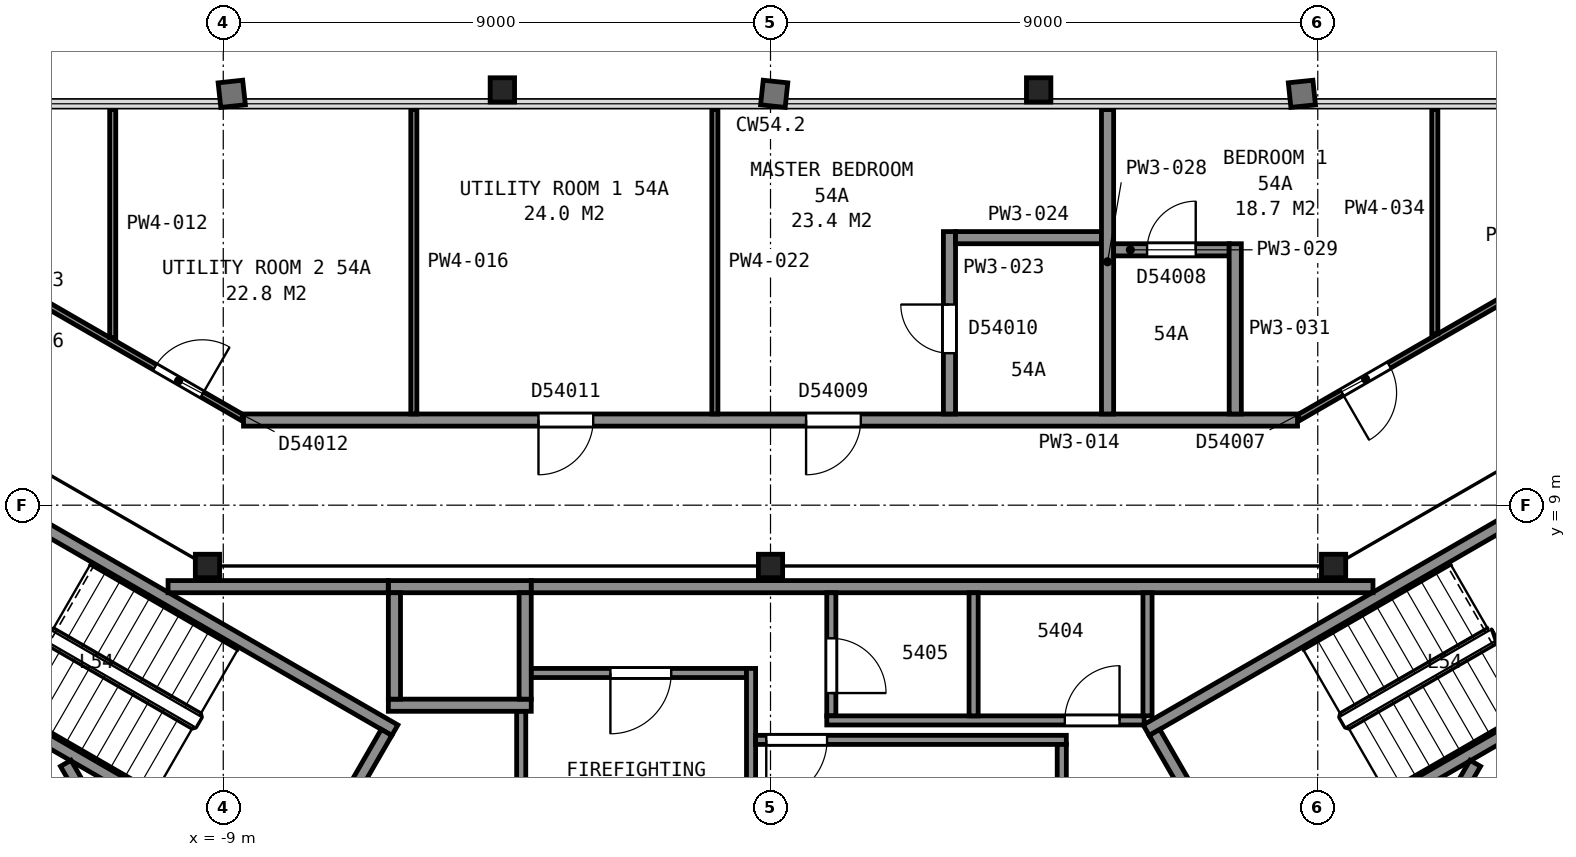
"""IFC4 building model, lengths in metres.
Left out: names, types, materials, properties, quantities, classifications, styles, units other than length and angle.
Written with IfcOpenShell. Run it as: python <this file> out.ifc"""

import sys

from ifc_helpers import new_model, si_unit, direction, frame, frame_2d, origin, origin_2d, place, context, subcontext, project, spatial, rectangle, i_section, extrude, element, fill, save


model = new_model("IFC4")
c1 = context("Model", 3, precision=1e-05, world=origin(), true_north=direction((0.0, 1.0)))
c2 = subcontext(c1, "Body", "Model", "MODEL_VIEW")
j1 = project(units=[si_unit("LENGTHUNIT", "METRE"), si_unit("PLANEANGLEUNIT", "RADIAN")], contexts=[c1])
p1 = place(None, origin())
s1 = spatial("IfcSite", under=j1, at=p1, CompositionType="ELEMENT")
p2 = place(p1, origin())
s2 = spatial("IfcBuilding", under=s1, at=p2, CompositionType="ELEMENT")
p3 = place(p2, frame((0.0, 0.0, 217.5)))
s3 = spatial("IfcBuildingStorey", under=s2, at=p3, CompositionType="ELEMENT", Elevation=217.5)
for number, where, z_axis, x_axis in (
    (1, (4.41, 15.83, 0.035), (0.0, 0.0, 1.0), (1.0, 0.0, 0.0)),
    (2, (-4.41, 15.83, 0.035), (0.0, 0.0, 1.0), (1.0, 0.0, 0.0)),
):
    element("IfcColumn", number, at=place(p3, frame(where, z_axis=z_axis, x_axis=x_axis)), inside=s3, PredefinedType="COLUMN", context=c2, shape_type="SweptSolid", body=[
        extrude(i_section(OverallWidth=0.401, OverallDepth=0.399, WebThickness=0.025, FlangeThickness=0.04, FilletRadius=0.015, at=origin_2d()), origin(), (0.0, 0.0, 1.0), 3.665),
    ])
for number, where, z_axis, x_axis in (
    (3, (9.26, 8.0, 0.0), (0.0, 0.0, 1.0), (1.0, 0.0, 0.0)),
    (4, (0.0, 8.0, 0.0), (0.0, 0.0, 1.0), (1.0, 0.0, 0.0)),
    (5, (-9.26, 8.0, 0.0), (0.0, 0.0, 1.0), (1.0, 0.0, 0.0)),
):
    element("IfcColumn", number, at=place(p3, frame(where, z_axis=z_axis, x_axis=x_axis)), inside=s3, PredefinedType="COLUMN", context=c2, shape_type="SweptSolid", body=[
        extrude(i_section(OverallWidth=0.399, OverallDepth=0.386, WebThickness=0.021, FlangeThickness=0.033, FilletRadius=0.015, at=origin_2d()), origin(), (0.0, 0.0, 1.0), 3.7),
    ])
for number, where, z_axis, x_axis in (
    (6, (6.178, 5.299, 0.0), (0.0, 0.0, 1.0), (0.866, 0.5, 0.0)),
    (7, (7.678, 2.701, 0.0), (0.0, 0.0, 1.0), (0.866, 0.5, 0.0)),
):
    element("IfcWall", number, at=place(p3, frame(where, z_axis=z_axis, x_axis=x_axis)), inside=s3, PredefinedType="PARTITIONING", context=c2, shape_type="SweptSolid", body=[
        extrude(rectangle(XDim=9.6, YDim=0.2, at=frame_2d((4.8, 0.0))), origin(), (0.0, 0.0, 1.0), 3.45),
    ])
p4 = place(p3, frame((7.715, 2.838, 0.0), z_axis=(0.0, 0.0, 1.0), x_axis=(-0.500049511043, 0.865996816683, 0.0)))
e8 = element("IfcWall", 8, at=p4, inside=s3, PredefinedType="PARTITIONING", context=c2, shape_type="SweptSolid", body=[
    extrude(rectangle(XDim=2.8, YDim=0.2, at=frame_2d((1.4, 0.0))), origin(), (0.0, 0.0, 1.0), 3.45),
])
for number, where, z_axis, x_axis in (
    (9, (-7.678, 2.701, 0.0), (0.0, 0.0, 1.0), (-0.866, 0.5, 0.0)),
    (10, (-6.178, 5.299, 0.0), (0.0, 0.0, 1.0), (-0.866, 0.5, 0.0)),
):
    element("IfcWall", number, at=place(p3, frame(where, z_axis=z_axis, x_axis=x_axis)), inside=s3, PredefinedType="PARTITIONING", context=c2, shape_type="SweptSolid", body=[
        extrude(rectangle(XDim=9.6, YDim=0.2, at=frame_2d((4.8, 0.0))), origin(), (0.0, 0.0, 1.0), 3.45),
    ])
p5 = place(p3, frame((-6.315, 5.262, 0.0), z_axis=(0.0, 0.0, 1.0), x_axis=(-0.500049511043, -0.865996816683, 0.0)))
e11 = element("IfcWall", 11, at=p5, inside=s3, PredefinedType="PARTITIONING", context=c2, shape_type="SweptSolid", body=[
    extrude(rectangle(XDim=2.8, YDim=0.2, at=frame_2d((1.4, 0.0))), origin(), (0.0, 0.0, 1.0), 3.45),
])
for number, where, z_axis, x_axis in (
    (12, (-6.285, 5.71, 0.0), (0.0, 0.0, 1.0), (1.0, 0.0, 0.0)),
    (13, (-6.285, 7.66, 0.0), (0.0, 0.0, 1.0), (1.0, 0.0, 0.0)),
):
    element("IfcWall", number, at=place(p3, frame(where, z_axis=z_axis, x_axis=x_axis)), inside=s3, PredefinedType="PARTITIONING", context=c2, shape_type="SweptSolid", body=[
        extrude(rectangle(XDim=2.35, YDim=0.2, at=frame_2d((1.175, 0.0))), origin(), (0.0, 0.0, 1.0), 3.7),
    ])
for number, where, z_axis, x_axis in (
    (14, (-4.035, 5.81, 0.0), (0.0, 0.0, 1.0), (0.0, 1.0, 0.0)),
    (15, (-6.185, 5.81, 0.0), (0.0, 0.0, 1.0), (0.0, 1.0, 0.0)),
):
    element("IfcWall", number, at=place(p3, frame(where, z_axis=z_axis, x_axis=x_axis)), inside=s3, PredefinedType="PARTITIONING", context=c2, shape_type="SweptSolid", body=[
        extrude(rectangle(XDim=1.75, YDim=0.2, at=frame_2d((0.875, 0.0))), origin(), (0.0, 0.0, 1.0), 3.7),
    ])
p6 = place(p3, frame((-11.591, 4.755, 0.0), z_axis=(0.0, 0.0, 1.0), x_axis=(0.500043977787, -0.866000011708, 0.0)))
e16 = element("IfcWall", 16, at=p6, inside=s3, PredefinedType="PARTITIONING", context=c2, shape_type="SweptSolid", body=[
    extrude(rectangle(XDim=6.617, YDim=0.2, at=frame_2d((3.308, 0.0))), origin(), (0.0, 0.0, 1.0), 3.45),
])
p7 = place(p6, frame((3.695, 0.0, 0.0)))
e17 = element("IfcOpeningElement", 17, at=p7, cuts=e16, PredefinedType="OPENING", context=c2, shape_type="SweptSolid", body=[
    extrude(rectangle(XDim=1.8, YDim=2.1, at=frame_2d((0.9, 1.05))), frame((0.0, 0.11, 0.0), z_axis=(0.0, -1.0, 0.0), x_axis=(1.0, 0.0, 0.0)), (0.0, 0.0, 1.0), 0.22),
])
p8 = place(p3, frame((-9.908, 7.66, 0.0), z_axis=(0.0, 0.0, 1.0), x_axis=(1.0, 0.0, 0.0)))
e18 = element("IfcWall", 18, at=p8, inside=s3, PredefinedType="PARTITIONING", context=c2, shape_type="SweptSolid", body=[
    extrude(rectangle(XDim=3.621, YDim=0.2, at=frame_2d((1.811, 0.0))), origin(), (0.0, 0.0, 1.0), 3.45),
])
p9 = place(p3, frame((-4.1, 2.085, 0.0), z_axis=(0.0, 0.0, 1.0), x_axis=(0.0, 1.0, 0.0)))
e19 = element("IfcWall", 19, at=p9, inside=s3, PredefinedType="PARTITIONING", context=c2, shape_type="SweptSolid", body=[
    extrude(rectangle(XDim=3.523, YDim=0.15, at=frame_2d((1.761, 0.0))), origin(), (0.0, 0.0, 1.0), 3.45),
])
p10 = place(p3, frame((-3.933, 6.24, 0.0), z_axis=(0.0, 0.0, 1.0), x_axis=(1.0, 0.0, 0.0)))
e20 = element("IfcWall", 20, at=p10, inside=s3, PredefinedType="PARTITIONING", context=c2, shape_type="SweptSolid", body=[
    extrude(rectangle(XDim=3.538, YDim=0.15, at=frame_2d((1.769, 0.0))), origin(), (0.0, 0.0, 1.0), 3.45),
])
p11 = place(p10, frame((1.3, 0.0, 0.0)))
e21 = element("IfcOpeningElement", 21, at=p11, cuts=e20, PredefinedType="OPENING", context=c2, shape_type="SweptSolid", body=[
    extrude(rectangle(XDim=1.0, YDim=2.1, at=frame_2d((0.5, 1.05))), frame((0.0, 0.085, 0.0), z_axis=(0.0, -1.0, 0.0), x_axis=(1.0, 0.0, 0.0)), (0.0, 0.0, 1.0), 0.17),
])
p12 = place(p3, frame((-3.933, 7.66, 0.0), z_axis=(0.0, 0.0, 1.0), x_axis=(1.0, 0.0, 0.0)))
e22 = element("IfcWall", 22, at=p12, inside=s3, PredefinedType="PARTITIONING", context=c2, shape_type="SweptSolid", body=[
    extrude(rectangle(XDim=13.841, YDim=0.2, at=frame_2d((6.92, 0.0))), origin(), (0.0, 0.0, 1.0), 3.45),
])
p13 = place(p3, frame((-0.32, 2.252, 0.0), z_axis=(0.0, 0.0, 1.0), x_axis=(0.0, 1.0, 0.0)))
e23 = element("IfcWall", 23, at=p13, inside=s3, PredefinedType="PARTITIONING", context=c2, shape_type="SweptSolid", body=[
    extrude(rectangle(XDim=4.063, YDim=0.15, at=frame_2d((2.031, 0.0))), origin(), (0.0, 0.0, 1.0), 3.45),
])
p14 = place(p3, frame((-0.245, 5.14, 0.0), z_axis=(0.0, 0.0, 1.0), x_axis=(1.0, 0.0, 0.0)))
e24 = element("IfcWall", 24, at=p14, inside=s3, PredefinedType="PARTITIONING", context=c2, shape_type="SweptSolid", body=[
    extrude(rectangle(XDim=5.11, YDim=0.15, at=frame_2d((2.555, 0.0))), origin(), (0.0, 0.0, 1.0), 3.45),
])
p15 = place(p14, frame((0.175, 0.0, 0.0)))
e25 = element("IfcOpeningElement", 25, at=p15, cuts=e24, PredefinedType="OPENING", context=c2, shape_type="SweptSolid", body=[
    extrude(rectangle(XDim=1.0, YDim=2.1, at=frame_2d((0.5, 1.05))), frame((0.0, 0.085, 0.0), z_axis=(0.0, -1.0, 0.0), x_axis=(1.0, 0.0, 0.0)), (0.0, 0.0, 1.0), 0.17),
])
p16 = place(p3, frame((1.0, 7.56, 0.0), z_axis=(0.0, 0.0, 1.0), x_axis=(0.0, -1.0, 0.0)))
e26 = element("IfcWall", 26, at=p16, inside=s3, PredefinedType="PARTITIONING", context=c2, shape_type="SweptSolid", body=[
    extrude(rectangle(XDim=2.025, YDim=0.15, at=frame_2d((1.013, 0.0))), origin(), (0.0, 0.0, 1.0), 3.45),
])
p17 = place(p16, frame((0.75, 0.0, 0.0)))
e27 = element("IfcOpeningElement", 27, at=p17, cuts=e26, PredefinedType="OPENING", context=c2, shape_type="SweptSolid", body=[
    extrude(rectangle(XDim=0.9, YDim=2.1, at=frame_2d((0.45, 1.05))), frame((0.0, 0.085, 0.0), z_axis=(0.0, -1.0, 0.0), x_axis=(1.0, 0.0, 0.0)), (0.0, 0.0, 1.0), 0.17),
])
p18 = place(p3, frame((0.925, 5.46, 0.0), z_axis=(0.0, 0.0, 1.0), x_axis=(1.0, 0.0, 0.0)))
e28 = element("IfcWall", 28, at=p18, inside=s3, PredefinedType="PARTITIONING", context=c2, shape_type="SweptSolid", body=[
    extrude(rectangle(XDim=5.22, YDim=0.15, at=frame_2d((2.61, 0.0))), origin(), (0.0, 0.0, 1.0), 3.45),
])
p19 = place(p18, frame((3.915, 0.0, 0.0)))
e29 = element("IfcOpeningElement", 29, at=p19, cuts=e28, PredefinedType="OPENING", context=c2, shape_type="SweptSolid", body=[
    extrude(rectangle(XDim=0.9, YDim=2.1, at=frame_2d((0.45, 1.05))), frame((0.0, 0.085, 0.0), z_axis=(0.0, -1.0, 0.0), x_axis=(1.0, 0.0, 0.0)), (0.0, 0.0, 1.0), 0.17),
])
p20 = place(p3, frame((3.34, 5.535, 0.0), z_axis=(0.0, 0.0, 1.0), x_axis=(0.0, 1.0, 0.0)))
e30 = element("IfcWall", 30, at=p20, inside=s3, PredefinedType="PARTITIONING", context=c2, shape_type="SweptSolid", body=[
    extrude(rectangle(XDim=2.025, YDim=0.15, at=frame_2d((1.013, 0.0))), origin(), (0.0, 0.0, 1.0), 3.45),
])
p21 = place(p3, frame((4.79, 2.085, 0.0), z_axis=(0.0, 0.0, 1.0), x_axis=(0.0, 1.0, 0.0)))
e31 = element("IfcWall", 31, at=p21, inside=s3, PredefinedType="PARTITIONING", context=c2, shape_type="SweptSolid", body=[
    extrude(rectangle(XDim=2.98, YDim=0.15, at=frame_2d((1.49, 0.0))), origin(), (0.0, 0.0, 1.0), 3.45),
])
p22 = place(p3, frame((6.2, 5.535, 0.0), z_axis=(0.0, 0.0, 1.0), x_axis=(0.0, 1.0, 0.0)))
e32 = element("IfcWall", 32, at=p22, inside=s3, PredefinedType="PARTITIONING", context=c2, shape_type="SweptSolid", body=[
    extrude(rectangle(XDim=2.025, YDim=0.15, at=frame_2d((1.013, 0.0))), origin(), (0.0, 0.0, 1.0), 3.45),
])
p23 = place(p3, frame((9.803, 1.658, 0.0), z_axis=(0.0, 0.0, 1.0), x_axis=(0.499943114462, 0.866058244174, 0.0)))
e33 = element("IfcWall", 33, at=p23, inside=s3, PredefinedType="PARTITIONING", context=c2, shape_type="SweptSolid", body=[
    extrude(rectangle(XDim=3.576, YDim=0.2, at=frame_2d((1.788, 0.0))), origin(), (0.0, 0.0, 1.0), 3.45),
])
p24 = place(p3, frame((-16.055, 14.693, 0.0), z_axis=(0.0, 0.0, 1.0), x_axis=(0.866070360466, -0.499922124658, 0.0)))
e34 = element("IfcWall", 34, at=p24, inside=s3, PredefinedType="PARTITIONING", context=c2, shape_type="SweptSolid", body=[
    extrude(rectangle(XDim=8.503, YDim=0.1, at=frame_2d((4.251, 0.0))), origin(), (0.0, 0.0, 1.0), 2.713),
])
p25 = place(p24, frame((6.847, 0.0, 0.0)))
e35 = element("IfcOpeningElement", 35, at=p25, cuts=e34, PredefinedType="OPENING", context=c2, shape_type="SweptSolid", body=[
    extrude(rectangle(XDim=0.9, YDim=2.1, at=frame_2d((0.45, 1.05))), frame((0.0, 0.06, 0.0), z_axis=(0.0, -1.0, 0.0), x_axis=(1.0, 0.0, 0.0)), (0.0, 0.0, 1.0), 0.12),
])
p26 = place(p24, frame((2.55, 0.0, 0.0)))
e36 = element("IfcOpeningElement", 36, at=p26, cuts=e34, PredefinedType="OPENING", context=c2, shape_type="SweptSolid", body=[
    extrude(rectangle(XDim=0.9, YDim=2.1, at=frame_2d((0.45, 1.05))), frame((0.0, 0.06, 0.0), z_axis=(0.0, -1.0, 0.0), x_axis=(1.0, 0.0, 0.0)), (0.0, 0.0, 1.0), 0.12),
])
p27 = place(p3, frame((-10.818, 11.757, 0.0), z_axis=(0.0, 0.0, 1.0), x_axis=(0.0, 1.0, 0.0)))
e37 = element("IfcWall", 37, at=p27, inside=s3, PredefinedType="PARTITIONING", context=c2, shape_type="SweptSolid", body=[
    extrude(rectangle(XDim=3.75, YDim=0.1, at=frame_2d((1.875, 0.0))), origin(), (0.0, 0.0, 1.0), 2.713),
])
p28 = place(p3, frame((-8.667, 10.4, 0.0), z_axis=(0.0, 0.0, 1.0), x_axis=(1.0, 0.0, 0.0)))
e38 = element("IfcWall", 38, at=p28, inside=s3, PredefinedType="PARTITIONING", context=c2, shape_type="SweptSolid", body=[
    extrude(rectangle(XDim=17.334, YDim=0.2, at=frame_2d((8.667, 0.0))), origin(), (0.0, 0.0, 1.0), 2.713),
])
p29 = place(p28, frame((9.252, 0.0, 0.0)))
e39 = element("IfcOpeningElement", 39, at=p29, cuts=e38, PredefinedType="OPENING", context=c2, shape_type="SweptSolid", body=[
    extrude(rectangle(XDim=0.9, YDim=2.1, at=frame_2d((0.45, 1.05))), frame((0.0, 0.11, 0.0), z_axis=(0.0, -1.0, 0.0), x_axis=(1.0, 0.0, 0.0)), (0.0, 0.0, 1.0), 0.22),
])
p30 = place(p28, frame((4.851, 0.0, 0.0)))
e40 = element("IfcOpeningElement", 40, at=p30, cuts=e38, PredefinedType="OPENING", context=c2, shape_type="SweptSolid", body=[
    extrude(rectangle(XDim=0.9, YDim=2.1, at=frame_2d((0.45, 1.05))), frame((0.0, 0.11, 0.0), z_axis=(0.0, -1.0, 0.0), x_axis=(1.0, 0.0, 0.0)), (0.0, 0.0, 1.0), 0.22),
])
for number, where, z_axis, x_axis in (
    (41, (-5.866, 10.5, 0.0), (0.0, 0.0, 1.0), (0.0, 1.0, 0.0)),
    (42, (-0.915, 10.5, 0.0), (0.0, 0.0, 1.0), (0.0, 1.0, 0.0)),
):
    element("IfcWall", number, at=place(p3, frame(where, z_axis=z_axis, x_axis=x_axis)), inside=s3, PredefinedType="PARTITIONING", context=c2, shape_type="SweptSolid", body=[
        extrude(rectangle(XDim=5.006, YDim=0.1, at=frame_2d((2.503, 0.0))), origin(), (0.0, 0.0, 1.0), 2.713),
    ])
p31 = place(p3, frame((2.943, 13.5, 0.0), z_axis=(0.0, 0.0, 1.0), x_axis=(0.0, -1.0, 0.0)))
e43 = element("IfcWall", 43, at=p31, inside=s3, PredefinedType="PARTITIONING", context=c2, shape_type="SweptSolid", body=[
    extrude(rectangle(XDim=3.0, YDim=0.2, at=frame_2d((1.5, 0.0))), origin(), (0.0, 0.0, 1.0), 2.713),
])
p32 = place(p31, frame((1.2, 0.0, 0.0)))
e44 = element("IfcOpeningElement", 44, at=p32, cuts=e43, PredefinedType="OPENING", context=c2, shape_type="SweptSolid", body=[
    extrude(rectangle(XDim=0.8, YDim=2.1, at=frame_2d((0.4, 1.05))), frame((0.0, 0.11, 0.0), z_axis=(0.0, -1.0, 0.0), x_axis=(1.0, 0.0, 0.0)), (0.0, 0.0, 1.0), 0.22),
])
p33 = place(p3, frame((3.043, 13.4, 0.0), z_axis=(0.0, 0.0, 1.0), x_axis=(1.0, 0.0, 0.0)))
e45 = element("IfcWall", 45, at=p33, inside=s3, PredefinedType="PARTITIONING", context=c2, shape_type="SweptSolid", body=[
    extrude(rectangle(XDim=2.4, YDim=0.2, at=frame_2d((1.2, 0.0))), origin(), (0.0, 0.0, 1.0), 2.713),
])
p34 = place(p3, frame((5.543, 10.5, 0.0), z_axis=(0.0, 0.0, 1.0), x_axis=(0.0, 1.0, 0.0)))
e46 = element("IfcWall", 46, at=p34, inside=s3, PredefinedType="PARTITIONING", context=c2, shape_type="SweptSolid", body=[
    extrude(rectangle(XDim=5.006, YDim=0.2, at=frame_2d((2.503, 0.0))), origin(), (0.0, 0.0, 1.0), 2.713),
])
p35 = place(p3, frame((7.543, 13.2, 0.0), z_axis=(0.0, 0.0, 1.0), x_axis=(-1.0, 0.0, 0.0)))
e47 = element("IfcWall", 47, at=p35, inside=s3, PredefinedType="PARTITIONING", context=c2, shape_type="SweptSolid", body=[
    extrude(rectangle(XDim=1.9, YDim=0.2, at=frame_2d((0.95, 0.0))), origin(), (0.0, 0.0, 1.0), 2.713),
])
p36 = place(p35, frame((0.55, 0.0, 0.0)))
e48 = element("IfcOpeningElement", 48, at=p36, cuts=e47, PredefinedType="OPENING", context=c2, shape_type="SweptSolid", body=[
    extrude(rectangle(XDim=0.8, YDim=2.1, at=frame_2d((0.4, 1.05))), frame((0.0, 0.11, 0.0), z_axis=(0.0, -1.0, 0.0), x_axis=(1.0, 0.0, 0.0)), (0.0, 0.0, 1.0), 0.22),
])
p37 = place(p3, frame((7.643, 10.5, 0.0), z_axis=(0.0, 0.0, 1.0), x_axis=(0.0, 1.0, 0.0)))
e49 = element("IfcWall", 49, at=p37, inside=s3, PredefinedType="PARTITIONING", context=c2, shape_type="SweptSolid", body=[
    extrude(rectangle(XDim=2.8, YDim=0.2, at=frame_2d((1.4, 0.0))), origin(), (0.0, 0.0, 1.0), 2.713),
])
p38 = place(p3, frame((8.691, 10.442, 0.0), z_axis=(0.0, 0.0, 1.0), x_axis=(0.866070360466, 0.499922124658, 0.0)))
e50 = element("IfcWall", 50, at=p38, inside=s3, PredefinedType="PARTITIONING", context=c2, shape_type="SweptSolid", body=[
    extrude(rectangle(XDim=8.503, YDim=0.1, at=frame_2d((4.251, 0.0))), origin(), (0.0, 0.0, 1.0), 2.713),
])
p39 = place(p38, frame((0.815, 0.0, 0.0)))
e51 = element("IfcOpeningElement", 51, at=p39, cuts=e50, PredefinedType="OPENING", context=c2, shape_type="SweptSolid", body=[
    extrude(rectangle(XDim=0.9, YDim=2.1, at=frame_2d((0.45, 1.05))), frame((0.0, 0.06, 0.0), z_axis=(0.0, -1.0, 0.0), x_axis=(1.0, 0.0, 0.0)), (0.0, 0.0, 1.0), 0.12),
])
p40 = place(p3, frame((10.925, 11.819, 0.0), z_axis=(0.0, 0.0, 1.0), x_axis=(0.0, 1.0, 0.0)))
e52 = element("IfcWall", 52, at=p40, inside=s3, PredefinedType="PARTITIONING", context=c2, shape_type="SweptSolid", body=[
    extrude(rectangle(XDim=3.688, YDim=0.1, at=frame_2d((1.844, 0.0))), origin(), (0.0, 0.0, 1.0), 2.713),
])
p41 = place(p11, origin())
e53 = element("IfcDoor", 53, at=p41, inside=s3, OperationType="SINGLE_SWING_LEFT", PredefinedType="DOOR", context=c2, shape_type="SweptSolid", body=[
    extrude(rectangle(XDim=1.0, YDim=2.1, at=frame_2d((0.5, 1.05))), frame((0.0, 0.025, 0.0), z_axis=(0.0, -1.0, 0.0), x_axis=(1.0, 0.0, 0.0)), (0.0, 0.0, 1.0), 0.05),
])
fill(e21, e53)
p42 = place(p15, origin())
e54 = element("IfcDoor", 54, at=p42, inside=s3, OperationType="SINGLE_SWING_LEFT", PredefinedType="DOOR", context=c2, shape_type="SweptSolid", body=[
    extrude(rectangle(XDim=1.0, YDim=2.1, at=frame_2d((0.5, 1.05))), frame((0.0, 0.025, 0.0), z_axis=(0.0, -1.0, 0.0), x_axis=(1.0, 0.0, 0.0)), (0.0, 0.0, 1.0), 0.05),
])
fill(e25, e54)
p43 = place(p17, origin())
e55 = element("IfcDoor", 55, at=p43, inside=s3, OperationType="SINGLE_SWING_RIGHT", PredefinedType="DOOR", context=c2, shape_type="SweptSolid", body=[
    extrude(rectangle(XDim=0.9, YDim=2.1, at=frame_2d((0.45, 1.05))), frame((0.0, 0.025, 0.0), z_axis=(0.0, -1.0, 0.0), x_axis=(1.0, 0.0, 0.0)), (0.0, 0.0, 1.0), 0.05),
])
fill(e27, e55)
p44 = place(p19, origin())
e56 = element("IfcDoor", 56, at=p44, inside=s3, OperationType="SINGLE_SWING_RIGHT", PredefinedType="DOOR", context=c2, shape_type="SweptSolid", body=[
    extrude(rectangle(XDim=0.9, YDim=2.1, at=frame_2d((0.45, 1.05))), frame((0.0, 0.025, 0.0), z_axis=(0.0, -1.0, 0.0), x_axis=(1.0, 0.0, 0.0)), (0.0, 0.0, 1.0), 0.05),
])
fill(e29, e56)
p45 = place(p25, origin())
e57 = element("IfcDoor", 57, at=p45, inside=s3, OperationType="SINGLE_SWING_RIGHT", PredefinedType="DOOR", context=c2, shape_type="SweptSolid", body=[
    extrude(rectangle(XDim=0.9, YDim=2.1, at=frame_2d((0.45, 1.05))), frame((0.0, 0.025, 0.0), z_axis=(0.0, -1.0, 0.0), x_axis=(1.0, 0.0, 0.0)), (0.0, 0.0, 1.0), 0.05),
])
fill(e35, e57)
p46 = place(p29, origin())
e58 = element("IfcDoor", 58, at=p46, inside=s3, OperationType="SINGLE_SWING_LEFT", PredefinedType="DOOR", context=c2, shape_type="SweptSolid", body=[
    extrude(rectangle(XDim=0.9, YDim=2.1, at=frame_2d((0.45, 1.05))), frame((0.0, 0.025, 0.0), z_axis=(0.0, -1.0, 0.0), x_axis=(1.0, 0.0, 0.0)), (0.0, 0.0, 1.0), 0.05),
])
fill(e39, e58)
p47 = place(p30, origin())
e59 = element("IfcDoor", 59, at=p47, inside=s3, OperationType="SINGLE_SWING_LEFT", PredefinedType="DOOR", context=c2, shape_type="SweptSolid", body=[
    extrude(rectangle(XDim=0.9, YDim=2.1, at=frame_2d((0.45, 1.05))), frame((0.0, 0.025, 0.0), z_axis=(0.0, -1.0, 0.0), x_axis=(1.0, 0.0, 0.0)), (0.0, 0.0, 1.0), 0.05),
])
fill(e40, e59)
p48 = place(p32, origin())
e60 = element("IfcDoor", 60, at=p48, inside=s3, OperationType="SINGLE_SWING_LEFT", PredefinedType="DOOR", context=c2, shape_type="SweptSolid", body=[
    extrude(rectangle(XDim=0.8, YDim=2.1, at=frame_2d((0.4, 1.05))), frame((0.0, 0.025, 0.0), z_axis=(0.0, -1.0, 0.0), x_axis=(1.0, 0.0, 0.0)), (0.0, 0.0, 1.0), 0.05),
])
fill(e44, e60)
p49 = place(p36, origin())
e61 = element("IfcDoor", 61, at=p49, inside=s3, OperationType="SINGLE_SWING_LEFT", PredefinedType="DOOR", context=c2, shape_type="SweptSolid", body=[
    extrude(rectangle(XDim=0.8, YDim=2.1, at=frame_2d((0.4, 1.05))), frame((0.0, 0.025, 0.0), z_axis=(0.0, -1.0, 0.0), x_axis=(1.0, 0.0, 0.0)), (0.0, 0.0, 1.0), 0.05),
])
fill(e48, e61)
p50 = place(p39, origin())
e62 = element("IfcDoor", 62, at=p50, inside=s3, OperationType="SINGLE_SWING_LEFT", PredefinedType="DOOR", context=c2, shape_type="SweptSolid", body=[
    extrude(rectangle(XDim=0.9, YDim=2.1, at=frame_2d((0.45, 1.05))), frame((0.0, 0.025, 0.0), z_axis=(0.0, -1.0, 0.0), x_axis=(1.0, 0.0, 0.0)), (0.0, 0.0, 1.0), 0.05),
])
fill(e51, e62)
save(model, sys.argv[1])
